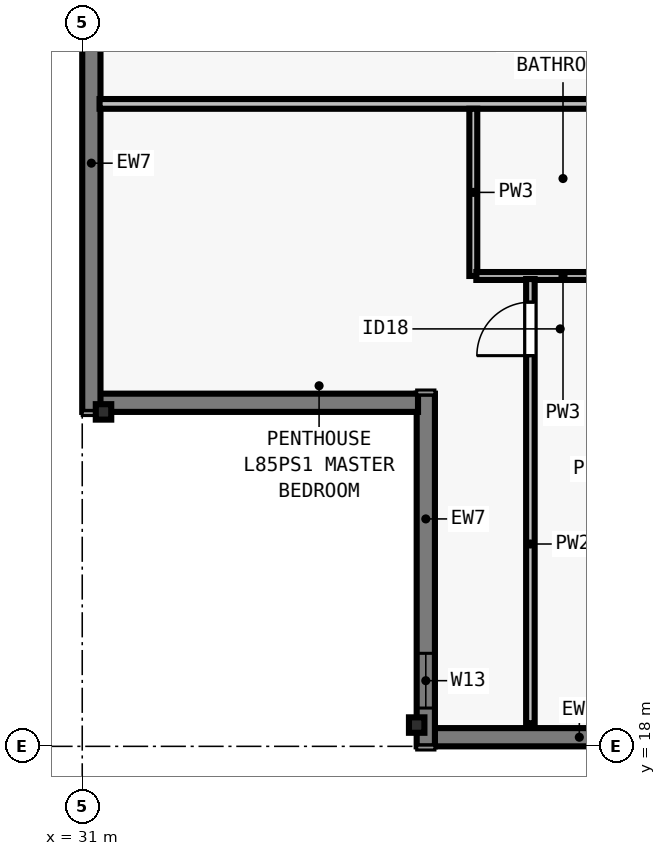
"""IFC4 building model, lengths in metres.
Left out: names, types, materials, properties, quantities, classifications, styles, units other than length and angle.
Written with IfcOpenShell. Run it as: python <this file> out.ifc"""

import sys

from ifc_helpers import new_model, si_unit, direction, frame, frame_2d, origin, origin_2d, place, context, subcontext, project, spatial, rectangle, i_section, extrude, element, fill, save


model = new_model("IFC4")
c1 = context("Model", 3, precision=1e-05, world=origin(), true_north=direction((0.0, 1.0)))
c2 = subcontext(c1, "Body", "Model", "MODEL_VIEW")
j1 = project(units=[si_unit("LENGTHUNIT", "METRE"), si_unit("PLANEANGLEUNIT", "RADIAN")], contexts=[c1])
p1 = place(None, origin())
s1 = spatial("IfcSite", under=j1, at=p1, CompositionType="ELEMENT")
p2 = place(p1, origin())
s2 = spatial("IfcBuilding", under=s1, at=p2, CompositionType="ELEMENT")
p3 = place(p2, frame((0.0, 0.0, 308.5)))
s3 = spatial("IfcBuildingStorey", under=s2, at=p3, CompositionType="ELEMENT", Elevation=308.5)
for number, where, z_axis, x_axis in (
    (1, (36.5, 18.35, 0.0), (0.0, 0.0, 1.0), (1.0, 0.0, 0.0)),
    (2, (31.35, 23.5, 0.0), (0.0, 0.0, 1.0), (0.0, 1.0, 0.0)),
):
    element("IfcColumn", number, at=place(p3, frame(where, z_axis=z_axis, x_axis=x_axis)), inside=s3, PredefinedType="COLUMN", context=c2, shape_type="SweptSolid", body=[
        extrude(i_section(OverallWidth=0.254, OverallDepth=0.254, WebThickness=0.009, FlangeThickness=0.014, FilletRadius=0.013, at=origin_2d()), origin(), (0.0, 0.0, 1.0), 3.5),
    ])
p4 = place(p3, frame((67.5, 18.15, 0.0), z_axis=(0.0, 0.0, 1.0), x_axis=(-1.0, 0.0, 0.0)))
e3 = element("IfcWall", 3, at=p4, inside=s3, PredefinedType="SOLIDWALL", context=c2, shape_type="SweptSolid", body=[
    extrude(rectangle(XDim=30.722, YDim=0.3, at=frame_2d((15.361, 0.0))), origin(), (0.0, 0.0, 1.0), 3.29),
])
p5 = place(p4, frame((4.769, 0.0, 0.8)))
e4 = element("IfcOpeningElement", 4, at=p5, cuts=e3, PredefinedType="OPENING", context=c2, shape_type="SweptSolid", body=[
    extrude(rectangle(XDim=2.0, YDim=1.758, at=frame_2d((1.0, 0.879))), frame((0.0, 0.16, 0.0), z_axis=(0.0, -1.0, 0.0), x_axis=(1.0, 0.0, 0.0)), (0.0, 0.0, 1.0), 0.32),
])
p6 = place(p4, frame((8.331, 0.0, 0.8)))
e5 = element("IfcOpeningElement", 5, at=p6, cuts=e3, PredefinedType="OPENING", context=c2, shape_type="SweptSolid", body=[
    extrude(rectangle(XDim=1.65, YDim=1.758, at=frame_2d((0.825, 0.879))), frame((0.0, 0.16, 0.0), z_axis=(0.0, -1.0, 0.0), x_axis=(1.0, 0.0, 0.0)), (0.0, 0.0, 1.0), 0.32),
])
p7 = place(p4, frame((12.442, 0.0, 0.8)))
e6 = element("IfcOpeningElement", 6, at=p7, cuts=e3, PredefinedType="OPENING", context=c2, shape_type="SweptSolid", body=[
    extrude(rectangle(XDim=2.0, YDim=1.758, at=frame_2d((1.0, 0.879))), frame((0.0, 0.16, 0.0), z_axis=(0.0, -1.0, 0.0), x_axis=(1.0, 0.0, 0.0)), (0.0, 0.0, 1.0), 0.32),
])
p8 = place(p4, frame((16.455, 0.0, 0.8)))
e7 = element("IfcOpeningElement", 7, at=p8, cuts=e3, PredefinedType="OPENING", context=c2, shape_type="SweptSolid", body=[
    extrude(rectangle(XDim=1.65, YDim=1.758, at=frame_2d((0.825, 0.879))), frame((0.0, 0.16, 0.0), z_axis=(0.0, -1.0, 0.0), x_axis=(1.0, 0.0, 0.0)), (0.0, 0.0, 1.0), 0.32),
])
p9 = place(p4, frame((20.967, 0.0, 0.8)))
e8 = element("IfcOpeningElement", 8, at=p9, cuts=e3, PredefinedType="OPENING", context=c2, shape_type="SweptSolid", body=[
    extrude(rectangle(XDim=2.0, YDim=1.758, at=frame_2d((1.0, 0.879))), frame((0.0, 0.16, 0.0), z_axis=(0.0, -1.0, 0.0), x_axis=(1.0, 0.0, 0.0)), (0.0, 0.0, 1.0), 0.32),
])
p10 = place(p4, frame((24.128, 0.0, 0.8)))
e9 = element("IfcOpeningElement", 9, at=p10, cuts=e3, PredefinedType="OPENING", context=c2, shape_type="SweptSolid", body=[
    extrude(rectangle(XDim=1.65, YDim=1.758, at=frame_2d((0.825, 0.879))), frame((0.0, 0.16, 0.0), z_axis=(0.0, -1.0, 0.0), x_axis=(1.0, 0.0, 0.0)), (0.0, 0.0, 1.0), 0.32),
])
p11 = place(p3, frame((36.65, 18.0, 0.0), z_axis=(0.0, 0.0, 1.0), x_axis=(0.0, 1.0, 0.0)))
e10 = element("IfcWall", 10, at=p11, inside=s3, PredefinedType="SOLIDWALL", context=c2, shape_type="SweptSolid", body=[
    extrude(rectangle(XDim=5.8, YDim=0.3, at=frame_2d((2.9, 0.0))), origin(), (0.0, 0.0, 1.0), 3.29),
])
p12 = place(p11, frame((0.63, 0.0, 0.8)))
e11 = element("IfcOpeningElement", 11, at=p12, cuts=e10, PredefinedType="OPENING", context=c2, shape_type="SweptSolid", body=[
    extrude(rectangle(XDim=0.9, YDim=1.75, at=frame_2d((0.45, 0.875))), frame((0.0, 0.16, 0.0), z_axis=(0.0, -1.0, 0.0), x_axis=(1.0, 0.0, 0.0)), (0.0, 0.0, 1.0), 0.32),
])
p13 = place(p3, frame((36.522, 23.65, 0.0), z_axis=(0.0, 0.0, 1.0), x_axis=(-1.0, 0.0, 0.0)))
e12 = element("IfcWall", 12, at=p13, inside=s3, PredefinedType="SOLIDWALL", context=c2, shape_type="SweptSolid", body=[
    extrude(rectangle(XDim=5.244, YDim=0.3, at=frame_2d((2.622, 0.0))), origin(), (0.0, 0.0, 1.0), 3.29),
])
p14 = place(p3, frame((31.15, 23.5, 0.0), z_axis=(0.0, 0.0, 1.0), x_axis=(0.0, 1.0, 0.0)))
e13 = element("IfcWall", 13, at=p14, inside=s3, PredefinedType="SOLIDWALL", context=c2, shape_type="SweptSolid", body=[
    extrude(rectangle(XDim=30.722, YDim=0.3, at=frame_2d((15.361, 0.0))), origin(), (0.0, 0.0, 1.0), 3.29),
])
p15 = place(p14, frame((8.331, 0.0, 0.8)))
e14 = element("IfcOpeningElement", 14, at=p15, cuts=e13, PredefinedType="OPENING", context=c2, shape_type="SweptSolid", body=[
    extrude(rectangle(XDim=1.65, YDim=1.758, at=frame_2d((0.825, 0.879))), frame((0.0, 0.16, 0.0), z_axis=(0.0, -1.0, 0.0), x_axis=(1.0, 0.0, 0.0)), (0.0, 0.0, 1.0), 0.32),
])
p16 = place(p14, frame((12.442, 0.0, 0.8)))
e15 = element("IfcOpeningElement", 15, at=p16, cuts=e13, PredefinedType="OPENING", context=c2, shape_type="SweptSolid", body=[
    extrude(rectangle(XDim=2.0, YDim=1.758, at=frame_2d((1.0, 0.879))), frame((0.0, 0.16, 0.0), z_axis=(0.0, -1.0, 0.0), x_axis=(1.0, 0.0, 0.0)), (0.0, 0.0, 1.0), 0.32),
])
p17 = place(p14, frame((16.455, 0.0, 0.8)))
e16 = element("IfcOpeningElement", 16, at=p17, cuts=e13, PredefinedType="OPENING", context=c2, shape_type="SweptSolid", body=[
    extrude(rectangle(XDim=1.65, YDim=1.758, at=frame_2d((0.825, 0.879))), frame((0.0, 0.16, 0.0), z_axis=(0.0, -1.0, 0.0), x_axis=(1.0, 0.0, 0.0)), (0.0, 0.0, 1.0), 0.32),
])
p18 = place(p14, frame((20.967, 0.0, 0.8)))
e17 = element("IfcOpeningElement", 17, at=p18, cuts=e13, PredefinedType="OPENING", context=c2, shape_type="SweptSolid", body=[
    extrude(rectangle(XDim=2.0, YDim=1.758, at=frame_2d((1.0, 0.879))), frame((0.0, 0.16, 0.0), z_axis=(0.0, -1.0, 0.0), x_axis=(1.0, 0.0, 0.0)), (0.0, 0.0, 1.0), 0.32),
])
p19 = place(p3, frame((31.285, 28.565, 0.0), z_axis=(0.0, 0.0, 1.0), x_axis=(1.0, 0.0, 0.0)))
e18 = element("IfcWall", 18, at=p19, inside=s3, PredefinedType="PARTITIONING", context=c2, shape_type="SweptSolid", body=[
    extrude(rectangle(XDim=41.43, YDim=0.16, at=frame_2d((20.715, 0.0))), origin(), (0.0, 0.0, 1.0), 3.009),
])
p20 = place(p19, frame((9.766, 0.0, 0.0)))
e19 = element("IfcOpeningElement", 19, at=p20, cuts=e18, PredefinedType="OPENING", context=c2, shape_type="SweptSolid", body=[
    extrude(rectangle(XDim=0.96, YDim=2.18, at=frame_2d((0.48, 1.09))), frame((0.0, 0.09, 0.0), z_axis=(0.0, -1.0, 0.0), x_axis=(1.0, 0.0, 0.0)), (0.0, 0.0, 1.0), 0.18),
])
p21 = place(p19, frame((30.346, 0.0, 0.0)))
e20 = element("IfcOpeningElement", 20, at=p21, cuts=e18, PredefinedType="OPENING", context=c2, shape_type="SweptSolid", body=[
    extrude(rectangle(XDim=0.96, YDim=2.18, at=frame_2d((0.48, 1.09))), frame((0.0, 0.09, 0.0), z_axis=(0.0, -1.0, 0.0), x_axis=(1.0, 0.0, 0.0)), (0.0, 0.0, 1.0), 0.18),
])
p22 = place(p3, frame((37.431, 25.735, 0.0), z_axis=(0.0, 0.0, 1.0), x_axis=(0.0, 1.0, 0.0)))
e21 = element("IfcWall", 21, at=p22, inside=s3, PredefinedType="PLUMBINGWALL", context=c2, shape_type="SweptSolid", body=[
    extrude(rectangle(XDim=2.75, YDim=0.13, at=frame_2d((1.375, 0.0))), origin(), (0.0, 0.0, 1.0), 3.29),
])
p23 = place(p3, frame((37.481, 25.735, 0.0), z_axis=(0.0, 0.0, 1.0), x_axis=(1.0, 0.0, 0.0)))
e22 = element("IfcWall", 22, at=p23, inside=s3, PredefinedType="PLUMBINGWALL", context=c2, shape_type="SweptSolid", body=[
    extrude(rectangle(XDim=2.85, YDim=0.13, at=frame_2d((1.425, 0.0))), origin(), (0.0, 0.0, 1.0), 3.29),
])
p24 = place(p3, frame((38.37, 18.38, 0.0), z_axis=(0.0, 0.0, 1.0), x_axis=(0.0, 1.0, 0.0)))
e23 = element("IfcWall", 23, at=p24, inside=s3, PredefinedType="PARTITIONING", context=c2, shape_type="SweptSolid", body=[
    extrude(rectangle(XDim=7.305, YDim=0.14, at=frame_2d((3.653, 0.0))), origin(), (0.0, 0.0, 1.0), 2.653),
])
p25 = place(p24, frame((6.045, 0.0, 0.0)))
e24 = element("IfcOpeningElement", 24, at=p25, cuts=e23, PredefinedType="OPENING", context=c2, shape_type="SweptSolid", body=[
    extrude(rectangle(XDim=0.88, YDim=2.1, at=frame_2d((0.44, 1.05))), frame((0.0, 0.08, 0.0), z_axis=(0.0, -1.0, 0.0), x_axis=(1.0, 0.0, 0.0)), (0.0, 0.0, 1.0), 0.16),
])
p26 = place(p12, origin())
e25 = element("IfcWindow", 25, at=p26, inside=s3, PartitioningType="SINGLE_PANEL", PredefinedType="WINDOW", context=c2, shape_type="SweptSolid", body=[
    extrude(rectangle(XDim=0.9, YDim=1.75, at=frame_2d((0.45, 0.875))), frame((0.0, -0.04, 0.0), z_axis=(0.0, -1.0, 0.0), x_axis=(1.0, 0.0, 0.0)), (0.0, 0.0, 1.0), 0.06),
])
fill(e11, e25)
p27 = place(p25, origin())
e26 = element("IfcDoor", 26, at=p27, inside=s3, OperationType="SINGLE_SWING_LEFT", PredefinedType="DOOR", context=c2, shape_type="SweptSolid", body=[
    extrude(rectangle(XDim=0.88, YDim=2.1, at=frame_2d((0.44, 1.05))), frame((0.0, 0.025, 0.0), z_axis=(0.0, -1.0, 0.0), x_axis=(1.0, 0.0, 0.0)), (0.0, 0.0, 1.0), 0.05),
])
fill(e24, e26)
save(model, sys.argv[1])
